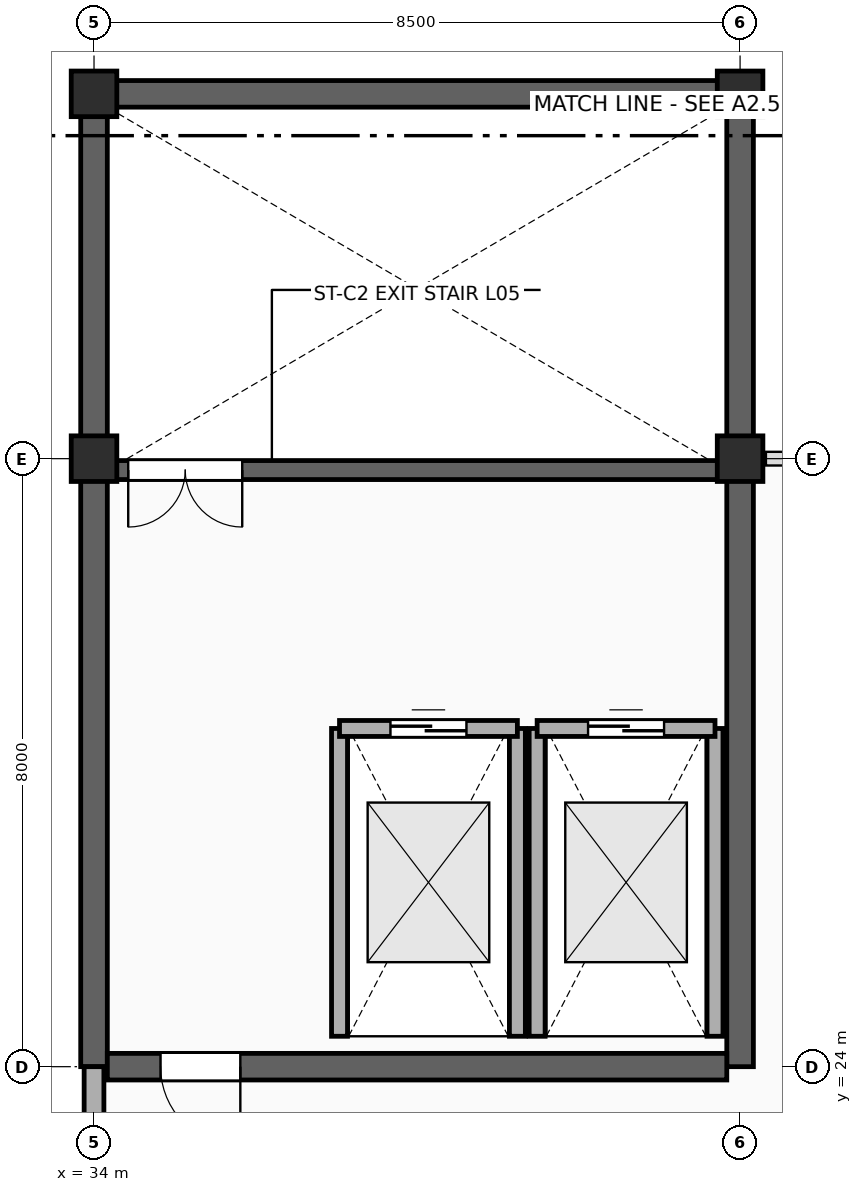
"""IFC4 building model, lengths in metres.
Left out: names, types, materials, properties, quantities, classifications, styles, units other than length and angle.
Written with IfcOpenShell. Run it as: python <this file> out.ifc"""

import sys

from ifc_helpers import new_model, si_unit, direction, frame, frame_2d, origin, origin_2d, place, context, subcontext, project, spatial, rectangle, extrude, element, fill, save


model = new_model("IFC4")
c1 = context("Model", 3, precision=1e-05, world=origin(), true_north=direction((0.0, 1.0)))
c2 = subcontext(c1, "Body", "Model", "MODEL_VIEW")
j1 = project(units=[si_unit("LENGTHUNIT", "METRE"), si_unit("PLANEANGLEUNIT", "RADIAN")], contexts=[c1])
p1 = place(None, origin())
s1 = spatial("IfcSite", under=j1, at=p1, CompositionType="ELEMENT")
p2 = place(p1, origin())
s2 = spatial("IfcBuilding", under=s1, at=p2, CompositionType="ELEMENT")
p3 = place(p2, frame((0.0, 0.0, 24.6)))
s3 = spatial("IfcBuildingStorey", under=s2, at=p3, CompositionType="ELEMENT", Elevation=24.6)
for number, where, z_axis, x_axis in (
    (1, (34.0, 24.0, 0.0), (0.0, 0.0, 1.0), (0.0, 1.0, 0.0)),
    (2, (42.5, 24.0, 0.0), (0.0, 0.0, 1.0), (0.0, 1.0, 0.0)),
):
    element("IfcWall", number, at=place(p3, frame(where, z_axis=z_axis, x_axis=x_axis)), inside=s3, PredefinedType="SHEAR", context=c2, shape_type="SweptSolid", body=[
        extrude(rectangle(XDim=12.8, YDim=0.35, at=frame_2d((6.4, 0.0))), origin(), (0.0, 0.0, 1.0), 4.49),
    ])
p4 = place(p3, frame((34.175, 36.8, 0.0), z_axis=(0.0, 0.0, 1.0), x_axis=(1.0, 0.0, 0.0)))
e3 = element("IfcWall", 3, at=p4, inside=s3, PredefinedType="SHEAR", context=c2, shape_type="SweptSolid", body=[
    extrude(rectangle(XDim=8.15, YDim=0.35, at=frame_2d((4.075, 0.0))), origin(), (0.0, 0.0, 1.0), 4.49),
])
p5 = place(p3, frame((34.175, 24.0, 0.0), z_axis=(0.0, 0.0, 1.0), x_axis=(1.0, 0.0, 0.0)))
e4 = element("IfcWall", 4, at=p5, inside=s3, PredefinedType="SHEAR", context=c2, shape_type="SweptSolid", body=[
    extrude(rectangle(XDim=8.15, YDim=0.35, at=frame_2d((4.075, 0.0))), origin(), (0.0, 0.0, 1.0), 4.49),
])
p6 = place(p5, frame((0.7, 0.0, 0.0)))
e5 = element("IfcOpeningElement", 5, at=p6, cuts=e4, PredefinedType="OPENING", context=c2, shape_type="SweptSolid", body=[
    extrude(rectangle(XDim=1.05, YDim=2.15, at=frame_2d((0.525, 1.075))), frame((0.0, 0.187, 0.0), z_axis=(0.0, -1.0, 0.0), x_axis=(1.0, 0.0, 0.0)), (0.0, 0.0, 1.0), 0.374),
])
p7 = place(p3, frame((34.25, 31.85, 0.0), z_axis=(0.0, 0.0, 1.0), x_axis=(1.0, 0.0, 0.0)))
e6 = element("IfcWall", 6, at=p7, inside=s3, PredefinedType="STANDARD", context=c2, shape_type="SweptSolid", body=[
    extrude(rectangle(XDim=8.0, YDim=0.25, at=frame_2d((4.0, 0.0))), origin(), (0.0, 0.0, 1.0), 4.49),
])
p8 = place(p7, frame((0.2, 0.0, 0.0)))
e7 = element("IfcOpeningElement", 7, at=p8, cuts=e6, PredefinedType="OPENING", context=c2, shape_type="SweptSolid", body=[
    extrude(rectangle(XDim=1.5, YDim=2.2, at=frame_2d((0.75, 1.1))), frame((0.0, 0.137, 0.0), z_axis=(0.0, -1.0, 0.0), x_axis=(1.0, 0.0, 0.0)), (0.0, 0.0, 1.0), 0.274),
])
for number, where, z_axis, x_axis in (
    (8, (37.23, 24.4, 0.0), (0.0, 0.0, 1.0), (0.0, 1.0, 0.0)),
    (9, (39.57, 24.4, 0.0), (0.0, 0.0, 1.0), (0.0, 1.0, 0.0)),
):
    element("IfcWall", number, at=place(p3, frame(where, z_axis=z_axis, x_axis=x_axis)), inside=s3, PredefinedType="PARTITIONING", context=c2, shape_type="SweptSolid", body=[
        extrude(rectangle(XDim=4.05, YDim=0.21, at=frame_2d((2.025, 0.0))), origin(), (0.0, 0.0, 1.0), 4.49),
    ])
p9 = place(p3, frame((37.23, 28.45, 0.0), z_axis=(0.0, 0.0, 1.0), x_axis=(1.0, 0.0, 0.0)))
e10 = element("IfcWall", 10, at=p9, inside=s3, PredefinedType="PARTITIONING", context=c2, shape_type="SweptSolid", body=[
    extrude(rectangle(XDim=2.34, YDim=0.21, at=frame_2d((1.17, 0.0))), origin(), (0.0, 0.0, 1.0), 4.49),
])
p10 = place(p9, frame((0.67, 0.0, 0.0)))
e11 = element("IfcOpeningElement", 11, at=p10, cuts=e10, PredefinedType="OPENING", context=c2, shape_type="SweptSolid", body=[
    extrude(rectangle(XDim=1.0, YDim=2.2, at=frame_2d((0.5, 1.1))), frame((0.0, 0.117, 0.0), z_axis=(0.0, -1.0, 0.0), x_axis=(1.0, 0.0, 0.0)), (0.0, 0.0, 1.0), 0.234),
])
for number, where, z_axis, x_axis in (
    (12, (39.83, 24.4, 0.0), (0.0, 0.0, 1.0), (0.0, 1.0, 0.0)),
    (13, (42.17, 24.4, 0.0), (0.0, 0.0, 1.0), (0.0, 1.0, 0.0)),
):
    element("IfcWall", number, at=place(p3, frame(where, z_axis=z_axis, x_axis=x_axis)), inside=s3, PredefinedType="PARTITIONING", context=c2, shape_type="SweptSolid", body=[
        extrude(rectangle(XDim=4.05, YDim=0.21, at=frame_2d((2.025, 0.0))), origin(), (0.0, 0.0, 1.0), 4.49),
    ])
p11 = place(p3, frame((39.83, 28.45, 0.0), z_axis=(0.0, 0.0, 1.0), x_axis=(1.0, 0.0, 0.0)))
e14 = element("IfcWall", 14, at=p11, inside=s3, PredefinedType="PARTITIONING", context=c2, shape_type="SweptSolid", body=[
    extrude(rectangle(XDim=2.34, YDim=0.21, at=frame_2d((1.17, 0.0))), origin(), (0.0, 0.0, 1.0), 4.49),
])
p12 = place(p11, frame((0.67, 0.0, 0.0)))
e15 = element("IfcOpeningElement", 15, at=p12, cuts=e14, PredefinedType="OPENING", context=c2, shape_type="SweptSolid", body=[
    extrude(rectangle(XDim=1.0, YDim=2.2, at=frame_2d((0.5, 1.1))), frame((0.0, 0.117, 0.0), z_axis=(0.0, -1.0, 0.0), x_axis=(1.0, 0.0, 0.0)), (0.0, 0.0, 1.0), 0.234),
])
for number, where, z_axis, x_axis in (
    (16, (34.0, 32.0, 0.0), (0.0, 0.0, 1.0), (1.0, 0.0, 0.0)),
    (17, (34.0, 36.8, 0.0), (0.0, 0.0, 1.0), (1.0, 0.0, 0.0)),
    (18, (42.5, 32.0, 0.0), (0.0, 0.0, 1.0), (1.0, 0.0, 0.0)),
    (19, (42.5, 36.8, 0.0), (0.0, 0.0, 1.0), (1.0, 0.0, 0.0)),
):
    element("IfcColumn", number, at=place(p3, frame(where, z_axis=z_axis, x_axis=x_axis)), inside=s3, PredefinedType="COLUMN", context=c2, shape_type="SweptSolid", body=[
        extrude(rectangle(XDim=0.6, YDim=0.6, at=origin_2d()), origin(), (0.0, 0.0, 1.0), 4.49),
    ])
p13 = place(p3, frame((34.0, 20.5, 0.0), z_axis=(0.0, 0.0, 1.0), x_axis=(0.0, 1.0, 0.0)))
e20 = element("IfcWall", 20, at=p13, inside=s3, PredefinedType="STANDARD", context=c2, shape_type="SweptSolid", body=[
    extrude(rectangle(XDim=3.5, YDim=0.26, at=frame_2d((1.75, 0.0))), origin(), (0.0, 0.0, 1.0), 4.228),
])
p14 = place(p8, frame((1.5, 0.0, 0.0), z_axis=(0.0, 0.0, 1.0), x_axis=(-1.0, 0.0, 0.0)))
e21 = element("IfcDoor", 21, at=p14, inside=s3, OperationType="DOUBLE_DOOR_SINGLE_SWING", PredefinedType="DOOR", context=c2, shape_type="SweptSolid", body=[
    extrude(rectangle(XDim=1.5, YDim=2.2, at=frame_2d((0.75, 1.1))), frame((0.0, 0.025, 0.0), z_axis=(0.0, -1.0, 0.0), x_axis=(1.0, 0.0, 0.0)), (0.0, 0.0, 1.0), 0.05),
])
fill(e7, e21)
p15 = place(p10, origin())
e22 = element("IfcDoor", 22, at=p15, inside=s3, OperationType="DOUBLE_DOOR_SLIDING", PredefinedType="DOOR", context=c2, shape_type="SweptSolid", body=[
    extrude(rectangle(XDim=1.0, YDim=2.2, at=frame_2d((0.5, 1.1))), frame((0.0, 0.025, 0.0), z_axis=(0.0, -1.0, 0.0), x_axis=(1.0, 0.0, 0.0)), (0.0, 0.0, 1.0), 0.05),
])
fill(e11, e22)
p16 = place(p12, origin())
e23 = element("IfcDoor", 23, at=p16, inside=s3, OperationType="DOUBLE_DOOR_SLIDING", PredefinedType="DOOR", context=c2, shape_type="SweptSolid", body=[
    extrude(rectangle(XDim=1.0, YDim=2.2, at=frame_2d((0.5, 1.1))), frame((0.0, 0.025, 0.0), z_axis=(0.0, -1.0, 0.0), x_axis=(1.0, 0.0, 0.0)), (0.0, 0.0, 1.0), 0.05),
])
fill(e15, e23)
p17 = place(p6, frame((1.05, 0.0, 0.0), z_axis=(0.0, 0.0, 1.0), x_axis=(-1.0, 0.0, 0.0)))
e24 = element("IfcDoor", 24, at=p17, inside=s3, OperationType="SINGLE_SWING_RIGHT", PredefinedType="DOOR", context=c2, shape_type="SweptSolid", body=[
    extrude(rectangle(XDim=1.05, YDim=2.15, at=frame_2d((0.525, 1.075))), frame((0.0, 0.025, 0.0), z_axis=(0.0, -1.0, 0.0), x_axis=(1.0, 0.0, 0.0)), (0.0, 0.0, 1.0), 0.05),
])
fill(e5, e24)
save(model, sys.argv[1])
